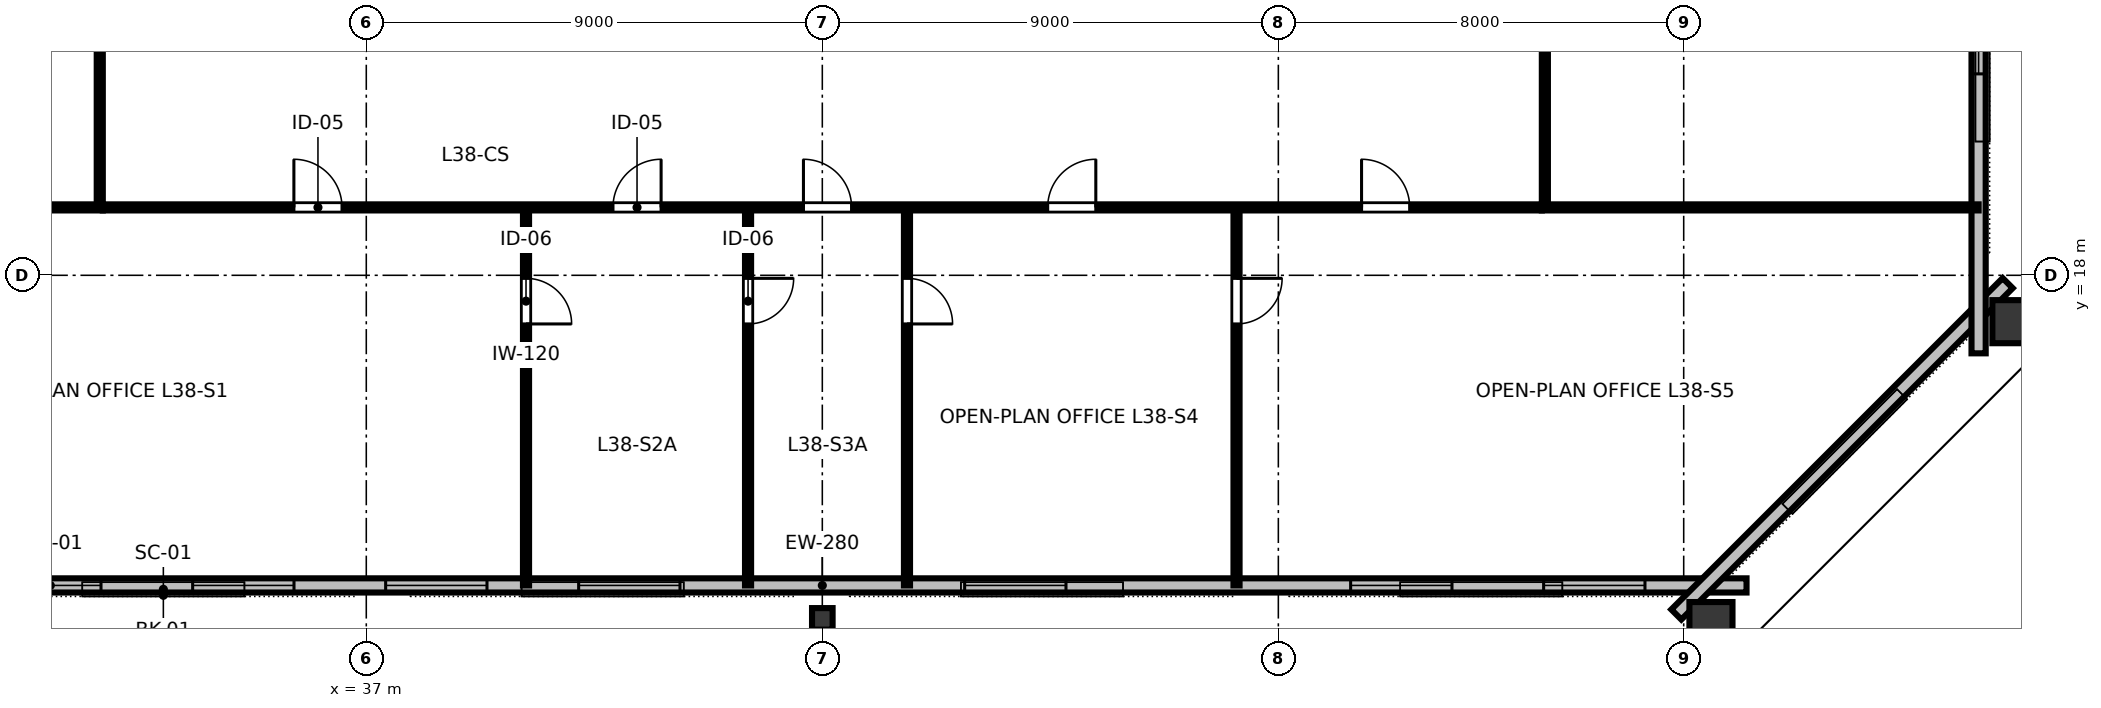
"""IFC4 building model, lengths in metres.
Left out: names, types, materials, properties, quantities, classifications, styles, units other than length and angle.
Written with IfcOpenShell. Run it as: python <this file> out.ifc"""

import sys

from ifc_helpers import new_model, si_unit, direction, frame, frame_2d, origin, origin_2d, place, context, subcontext, project, spatial, rectangle, hollow_rectangle, i_section, extrude, element, fill, save


model = new_model("IFC4")
c1 = context("Model", 3, precision=1e-05, world=origin(), true_north=direction((0.0, 1.0)))
c2 = subcontext(c1, "Body", "Model", "MODEL_VIEW")
j1 = project(units=[si_unit("LENGTHUNIT", "METRE"), si_unit("PLANEANGLEUNIT", "RADIAN")], contexts=[c1])
p1 = place(None, origin())
s1 = spatial("IfcSite", under=j1, at=p1, CompositionType="ELEMENT")
p2 = place(p1, origin())
s2 = spatial("IfcBuilding", under=s1, at=p2, CompositionType="ELEMENT")
p3 = place(p2, frame((0.0, 0.0, 145.6)))
s3 = spatial("IfcBuildingStorey", under=s2, at=p3, CompositionType="ELEMENT", Elevation=145.6)
p4 = place(p3, frame((46.0, 11.22, 0.0), z_axis=(0.0, -0.074245582927, 0.997239987874), x_axis=(1.0, 0.0, 0.0)))
e1 = element("IfcColumn", 1, at=p4, inside=s3, PredefinedType="COLUMN", context=c2, shape_type="SweptSolid", body=[
    extrude(i_section(OverallWidth=0.406, OverallDepth=0.425, WebThickness=0.033, FlangeThickness=0.052, FilletRadius=0.025, at=origin_2d()), origin(), (0.0, 0.0, 1.0), 3.367),
])
p5 = place(p3, frame((63.538, 11.052, 0.0), z_axis=(0.059277862286, -0.074043044101, 0.995491719033), x_axis=(0.780645414878, 0.624974188451, 0.0)))
e2 = element("IfcColumn", 2, at=p5, inside=s3, PredefinedType="COLUMN", context=c2, shape_type="SweptSolid", body=[
    extrude(hollow_rectangle(XDim=0.85, YDim=1.0, WallThickness=0.05, at=origin_2d()), origin(), (0.0, 0.0, 1.0), 3.373),
])
p6 = place(p3, frame((69.591, 17.085, 0.0), z_axis=(0.088840732105, -0.044637403672, 0.995045137927), x_axis=(-0.889124879538, 0.446734568954, 0.099424209766)))
e3 = element("IfcColumn", 3, at=p6, inside=s3, PredefinedType="COLUMN", context=c2, shape_type="SweptSolid", body=[
    extrude(hollow_rectangle(XDim=0.85, YDim=1.0, WallThickness=0.05, at=origin_2d()), origin(), (0.0, 0.0, 1.0), 3.375),
])
p7 = place(p3, frame((27.76, 11.88, 0.0), z_axis=(0.0, 0.0, 1.0), x_axis=(1.0, 0.0, 0.0)))
e4 = element("IfcWall", 4, at=p7, inside=s3, PredefinedType="STANDARD", context=c2, shape_type="SweptSolid", body=[
    extrude(rectangle(XDim=36.48, YDim=0.28, at=frame_2d((18.24, 0.0))), origin(), (0.0, 0.0, 1.0), 3.36),
])
p8 = place(p7, frame((2.004, 0.0, 0.8)))
e5 = element("IfcOpeningElement", 5, at=p8, cuts=e4, PredefinedType="OPENING", context=c2, shape_type="SweptSolid", body=[
    extrude(rectangle(XDim=2.0, YDim=1.95, at=frame_2d((1.0, 0.975))), frame((0.0, 0.15, 0.0), z_axis=(0.0, -1.0, 0.0), x_axis=(1.0, 0.0, 0.0)), (0.0, 0.0, 1.0), 0.3),
])
p9 = place(p7, frame((5.813, 0.0, 0.8)))
e6 = element("IfcOpeningElement", 6, at=p9, cuts=e4, PredefinedType="OPENING", context=c2, shape_type="SweptSolid", body=[
    extrude(rectangle(XDim=2.0, YDim=1.95, at=frame_2d((1.0, 0.975))), frame((0.0, 0.15, 0.0), z_axis=(0.0, -1.0, 0.0), x_axis=(1.0, 0.0, 0.0)), (0.0, 0.0, 1.0), 0.3),
])
p10 = place(p7, frame((9.622, 0.0, 0.8)))
e7 = element("IfcOpeningElement", 7, at=p10, cuts=e4, PredefinedType="OPENING", context=c2, shape_type="SweptSolid", body=[
    extrude(rectangle(XDim=2.0, YDim=1.95, at=frame_2d((1.0, 0.975))), frame((0.0, 0.15, 0.0), z_axis=(0.0, -1.0, 0.0), x_axis=(1.0, 0.0, 0.0)), (0.0, 0.0, 1.0), 0.3),
])
p11 = place(p7, frame((13.431, 0.0, 0.8)))
e8 = element("IfcOpeningElement", 8, at=p11, cuts=e4, PredefinedType="OPENING", context=c2, shape_type="SweptSolid", body=[
    extrude(rectangle(XDim=2.0, YDim=1.95, at=frame_2d((1.0, 0.975))), frame((0.0, 0.15, 0.0), z_axis=(0.0, -1.0, 0.0), x_axis=(1.0, 0.0, 0.0)), (0.0, 0.0, 1.0), 0.3),
])
p12 = place(p7, frame((21.049, 0.0, 0.8)))
e9 = element("IfcOpeningElement", 9, at=p12, cuts=e4, PredefinedType="OPENING", context=c2, shape_type="SweptSolid", body=[
    extrude(rectangle(XDim=2.0, YDim=1.95, at=frame_2d((1.0, 0.975))), frame((0.0, 0.15, 0.0), z_axis=(0.0, -1.0, 0.0), x_axis=(1.0, 0.0, 0.0)), (0.0, 0.0, 1.0), 0.3),
])
p13 = place(p7, frame((28.667, 0.0, 0.8)))
e10 = element("IfcOpeningElement", 10, at=p13, cuts=e4, PredefinedType="OPENING", context=c2, shape_type="SweptSolid", body=[
    extrude(rectangle(XDim=2.0, YDim=1.95, at=frame_2d((1.0, 0.975))), frame((0.0, 0.15, 0.0), z_axis=(0.0, -1.0, 0.0), x_axis=(1.0, 0.0, 0.0)), (0.0, 0.0, 1.0), 0.3),
])
p14 = place(p7, frame((32.476, 0.0, 0.8)))
e11 = element("IfcOpeningElement", 11, at=p14, cuts=e4, PredefinedType="OPENING", context=c2, shape_type="SweptSolid", body=[
    extrude(rectangle(XDim=2.0, YDim=1.95, at=frame_2d((1.0, 0.975))), frame((0.0, 0.15, 0.0), z_axis=(0.0, -1.0, 0.0), x_axis=(1.0, 0.0, 0.0)), (0.0, 0.0, 1.0), 0.3),
])
p15 = place(p3, frame((62.854, 11.306, 0.0), z_axis=(0.0, 0.0, 1.0), x_axis=(0.707106781187, 0.707106781187, 0.0)))
e12 = element("IfcWall", 12, at=p15, inside=s3, PredefinedType="STANDARD", context=c2, shape_type="SweptSolid", body=[
    extrude(rectangle(XDim=9.248, YDim=0.28, at=frame_2d((4.624, 0.0))), origin(), (0.0, 0.0, 1.0), 3.36),
])
p16 = place(p3, frame((68.82, 16.46, 0.0), z_axis=(0.0, 0.0, 1.0), x_axis=(0.0, 1.0, 0.0)))
e13 = element("IfcWall", 13, at=p16, inside=s3, PredefinedType="STANDARD", context=c2, shape_type="SweptSolid", body=[
    extrude(rectangle(XDim=31.08, YDim=0.28, at=frame_2d((15.54, 0.0))), origin(), (0.0, 0.0, 1.0), 3.36),
])
p17 = place(p16, frame((11.86, 0.0, 0.0)))
e14 = element("IfcOpeningElement", 14, at=p17, cuts=e13, PredefinedType="OPENING", context=c2, shape_type="SweptSolid", body=[
    extrude(rectangle(XDim=1.4, YDim=2.15, at=frame_2d((0.7, 1.075))), frame((0.0, 0.15, 0.0), z_axis=(0.0, -1.0, 0.0), x_axis=(1.0, 0.0, 0.0)), (0.0, 0.0, 1.0), 0.3),
])
p18 = place(p16, frame((5.515, 0.0, 0.8)))
e15 = element("IfcOpeningElement", 15, at=p18, cuts=e13, PredefinedType="OPENING", context=c2, shape_type="SweptSolid", body=[
    extrude(rectangle(XDim=2.0, YDim=1.95, at=frame_2d((1.0, 0.975))), frame((0.0, 0.15, 0.0), z_axis=(0.0, -1.0, 0.0), x_axis=(1.0, 0.0, 0.0)), (0.0, 0.0, 1.0), 0.3),
])
p19 = place(p16, frame((9.125, 0.0, 0.8)))
e16 = element("IfcOpeningElement", 16, at=p19, cuts=e13, PredefinedType="OPENING", context=c2, shape_type="SweptSolid", body=[
    extrude(rectangle(XDim=2.0, YDim=1.95, at=frame_2d((1.0, 0.975))), frame((0.0, 0.15, 0.0), z_axis=(0.0, -1.0, 0.0), x_axis=(1.0, 0.0, 0.0)), (0.0, 0.0, 1.0), 0.3),
])
p20 = place(p16, frame((19.955, 0.0, 0.8)))
e17 = element("IfcOpeningElement", 17, at=p20, cuts=e13, PredefinedType="OPENING", context=c2, shape_type="SweptSolid", body=[
    extrude(rectangle(XDim=2.0, YDim=1.95, at=frame_2d((1.0, 0.975))), frame((0.0, 0.15, 0.0), z_axis=(0.0, -1.0, 0.0), x_axis=(1.0, 0.0, 0.0)), (0.0, 0.0, 1.0), 0.3),
])
p21 = place(p16, frame((23.565, 0.0, 0.8)))
e18 = element("IfcOpeningElement", 18, at=p21, cuts=e13, PredefinedType="OPENING", context=c2, shape_type="SweptSolid", body=[
    extrude(rectangle(XDim=2.0, YDim=1.95, at=frame_2d((1.0, 0.975))), frame((0.0, 0.15, 0.0), z_axis=(0.0, -1.0, 0.0), x_axis=(1.0, 0.0, 0.0)), (0.0, 0.0, 1.0), 0.3),
])
p22 = place(p3, frame((40.152, 19.34, 0.0), z_axis=(0.0, 0.0, 1.0), x_axis=(0.0, -1.0, 0.0)))
e19 = element("IfcWall", 19, at=p22, inside=s3, PredefinedType="PARTITIONING", context=c2, shape_type="SweptSolid", body=[
    extrude(rectangle(XDim=7.46, YDim=0.12, at=frame_2d((3.73, 0.0))), origin(), (0.0, 0.0, 1.0), 2.64),
])
p23 = place(p22, frame((1.4, 0.0, 0.0)))
e20 = element("IfcOpeningElement", 20, at=p23, cuts=e19, PredefinedType="OPENING", context=c2, shape_type="SweptSolid", body=[
    extrude(rectangle(XDim=0.9, YDim=2.15, at=frame_2d((0.45, 1.075))), frame((0.0, 0.07, 0.0), z_axis=(0.0, -1.0, 0.0), x_axis=(1.0, 0.0, 0.0)), (0.0, 0.0, 1.0), 0.14),
])
p24 = place(p3, frame((44.534, 19.34, 0.0), z_axis=(0.0, 0.0, 1.0), x_axis=(0.0, -1.0, 0.0)))
e21 = element("IfcWall", 21, at=p24, inside=s3, PredefinedType="PARTITIONING", context=c2, shape_type="SweptSolid", body=[
    extrude(rectangle(XDim=7.46, YDim=0.12, at=frame_2d((3.73, 0.0))), origin(), (0.0, 0.0, 1.0), 2.64),
])
p25 = place(p24, frame((1.4, 0.0, 0.0)))
e22 = element("IfcOpeningElement", 22, at=p25, cuts=e21, PredefinedType="OPENING", context=c2, shape_type="SweptSolid", body=[
    extrude(rectangle(XDim=0.9, YDim=2.15, at=frame_2d((0.45, 1.075))), frame((0.0, 0.07, 0.0), z_axis=(0.0, -1.0, 0.0), x_axis=(1.0, 0.0, 0.0)), (0.0, 0.0, 1.0), 0.14),
])
p26 = place(p3, frame((47.671, 19.34, 0.0), z_axis=(0.0, 0.0, 1.0), x_axis=(0.0, -1.0, 0.0)))
e23 = element("IfcWall", 23, at=p26, inside=s3, PredefinedType="PARTITIONING", context=c2, shape_type="SweptSolid", body=[
    extrude(rectangle(XDim=7.46, YDim=0.12, at=frame_2d((3.73, 0.0))), origin(), (0.0, 0.0, 1.0), 2.64),
])
p27 = place(p26, frame((1.4, 0.0, 0.0)))
e24 = element("IfcOpeningElement", 24, at=p27, cuts=e23, PredefinedType="OPENING", context=c2, shape_type="SweptSolid", body=[
    extrude(rectangle(XDim=0.9, YDim=2.15, at=frame_2d((0.45, 1.075))), frame((0.0, 0.07, 0.0), z_axis=(0.0, -1.0, 0.0), x_axis=(1.0, 0.0, 0.0)), (0.0, 0.0, 1.0), 0.14),
])
p28 = place(p3, frame((54.175, 19.34, 0.0), z_axis=(0.0, 0.0, 1.0), x_axis=(0.0, -1.0, 0.0)))
e25 = element("IfcWall", 25, at=p28, inside=s3, PredefinedType="PARTITIONING", context=c2, shape_type="SweptSolid", body=[
    extrude(rectangle(XDim=7.46, YDim=0.12, at=frame_2d((3.73, 0.0))), origin(), (0.0, 0.0, 1.0), 2.64),
])
p29 = place(p28, frame((1.4, 0.0, 0.0)))
e26 = element("IfcOpeningElement", 26, at=p29, cuts=e25, PredefinedType="OPENING", context=c2, shape_type="SweptSolid", body=[
    extrude(rectangle(XDim=0.9, YDim=2.15, at=frame_2d((0.45, 1.075))), frame((0.0, 0.07, 0.0), z_axis=(0.0, -1.0, 0.0), x_axis=(1.0, 0.0, 0.0)), (0.0, 0.0, 1.0), 0.14),
])
p30 = place(p3, frame((31.8, 19.34, 0.0), z_axis=(0.0, 0.0, 1.0), x_axis=(1.0, 0.0, 0.0)))
e27 = element("IfcWall", 27, at=p30, inside=s3, PredefinedType="PARTITIONING", context=c2, shape_type="SweptSolid", body=[
    extrude(rectangle(XDim=28.4, YDim=0.12, at=frame_2d((14.2, 0.0))), origin(), (0.0, 0.0, 1.0), 2.64),
])
p31 = place(p30, frame((3.771, 0.0, 0.0)))
e28 = element("IfcOpeningElement", 28, at=p31, cuts=e27, PredefinedType="OPENING", context=c2, shape_type="SweptSolid", body=[
    extrude(rectangle(XDim=0.95, YDim=2.15, at=frame_2d((0.475, 1.075))), frame((0.0, 0.07, 0.0), z_axis=(0.0, -1.0, 0.0), x_axis=(1.0, 0.0, 0.0)), (0.0, 0.0, 1.0), 0.14),
])
p32 = place(p30, frame((10.068, 0.0, 0.0)))
e29 = element("IfcOpeningElement", 29, at=p32, cuts=e27, PredefinedType="OPENING", context=c2, shape_type="SweptSolid", body=[
    extrude(rectangle(XDim=0.95, YDim=2.15, at=frame_2d((0.475, 1.075))), frame((0.0, 0.07, 0.0), z_axis=(0.0, -1.0, 0.0), x_axis=(1.0, 0.0, 0.0)), (0.0, 0.0, 1.0), 0.14),
])
p33 = place(p30, frame((13.828, 0.0, 0.0)))
e30 = element("IfcOpeningElement", 30, at=p33, cuts=e27, PredefinedType="OPENING", context=c2, shape_type="SweptSolid", body=[
    extrude(rectangle(XDim=0.95, YDim=2.15, at=frame_2d((0.475, 1.075))), frame((0.0, 0.07, 0.0), z_axis=(0.0, -1.0, 0.0), x_axis=(1.0, 0.0, 0.0)), (0.0, 0.0, 1.0), 0.14),
])
p34 = place(p30, frame((18.648, 0.0, 0.0)))
e31 = element("IfcOpeningElement", 31, at=p34, cuts=e27, PredefinedType="OPENING", context=c2, shape_type="SweptSolid", body=[
    extrude(rectangle(XDim=0.95, YDim=2.15, at=frame_2d((0.475, 1.075))), frame((0.0, 0.07, 0.0), z_axis=(0.0, -1.0, 0.0), x_axis=(1.0, 0.0, 0.0)), (0.0, 0.0, 1.0), 0.14),
])
p35 = place(p30, frame((24.842, 0.0, 0.0)))
e32 = element("IfcOpeningElement", 32, at=p35, cuts=e27, PredefinedType="OPENING", context=c2, shape_type="SweptSolid", body=[
    extrude(rectangle(XDim=0.95, YDim=2.15, at=frame_2d((0.475, 1.075))), frame((0.0, 0.07, 0.0), z_axis=(0.0, -1.0, 0.0), x_axis=(1.0, 0.0, 0.0)), (0.0, 0.0, 1.0), 0.14),
])
p36 = place(p3, frame((31.74, 19.4, 0.0), z_axis=(0.0, 0.0, 1.0), x_axis=(0.0, 1.0, 0.0)))
e33 = element("IfcWall", 33, at=p36, inside=s3, PredefinedType="PARTITIONING", context=c2, shape_type="SweptSolid", body=[
    extrude(rectangle(XDim=11.58, YDim=0.12, at=frame_2d((5.79, 0.0))), origin(), (0.0, 0.0, 1.0), 2.64),
])
p37 = place(p36, frame((4.868, 0.0, 0.0)))
e34 = element("IfcOpeningElement", 34, at=p37, cuts=e33, PredefinedType="OPENING", context=c2, shape_type="SweptSolid", body=[
    extrude(rectangle(XDim=0.95, YDim=2.15, at=frame_2d((0.475, 1.075))), frame((0.0, 0.07, 0.0), z_axis=(0.0, -1.0, 0.0), x_axis=(1.0, 0.0, 0.0)), (0.0, 0.0, 1.0), 0.14),
])
p38 = place(p3, frame((60.26, 19.4, 0.0), z_axis=(0.0, 0.0, 1.0), x_axis=(0.0, 1.0, 0.0)))
e35 = element("IfcWall", 35, at=p38, inside=s3, PredefinedType="PARTITIONING", context=c2, shape_type="SweptSolid", body=[
    extrude(rectangle(XDim=11.58, YDim=0.12, at=frame_2d((5.79, 0.0))), origin(), (0.0, 0.0, 1.0), 2.64),
])
p39 = place(p38, frame((5.415, 0.0, 0.0)))
e36 = element("IfcOpeningElement", 36, at=p39, cuts=e35, PredefinedType="OPENING", context=c2, shape_type="SweptSolid", body=[
    extrude(rectangle(XDim=0.95, YDim=2.15, at=frame_2d((0.475, 1.075))), frame((0.0, 0.07, 0.0), z_axis=(0.0, -1.0, 0.0), x_axis=(1.0, 0.0, 0.0)), (0.0, 0.0, 1.0), 0.14),
])
for number, where, z_axis, x_axis in (
    (37, (31.8, 19.34, 0.0), (0.0, 0.0, 1.0), (-1.0, 0.0, 0.0)),
    (38, (60.2, 19.34, 0.0), (0.0, 0.0, 1.0), (1.0, 0.0, 0.0)),
):
    element("IfcWall", number, at=place(p3, frame(where, z_axis=z_axis, x_axis=x_axis)), inside=s3, PredefinedType="PARTITIONING", context=c2, shape_type="SweptSolid", body=[
        extrude(rectangle(XDim=8.62, YDim=0.12, at=frame_2d((4.31, 0.0))), origin(), (0.0, 0.0, 1.0), 2.64),
    ])
p40 = place(p8, origin())
e39 = element("IfcWindow", 39, at=p40, inside=s3, PartitioningType="SINGLE_PANEL", PredefinedType="WINDOW", context=c2, shape_type="SweptSolid", body=[
    extrude(rectangle(XDim=2.0, YDim=1.95, at=frame_2d((1.0, 0.975))), frame((0.0, 0.03, 0.0), z_axis=(0.0, -1.0, 0.0), x_axis=(1.0, 0.0, 0.0)), (0.0, 0.0, 1.0), 0.06),
])
fill(e5, e39)
p41 = place(p9, origin())
e40 = element("IfcWindow", 40, at=p41, inside=s3, PartitioningType="SINGLE_PANEL", PredefinedType="WINDOW", context=c2, shape_type="SweptSolid", body=[
    extrude(rectangle(XDim=2.0, YDim=1.95, at=frame_2d((1.0, 0.975))), frame((0.0, 0.03, 0.0), z_axis=(0.0, -1.0, 0.0), x_axis=(1.0, 0.0, 0.0)), (0.0, 0.0, 1.0), 0.06),
])
fill(e6, e40)
p42 = place(p10, origin())
e41 = element("IfcWindow", 41, at=p42, inside=s3, PartitioningType="SINGLE_PANEL", PredefinedType="WINDOW", context=c2, shape_type="SweptSolid", body=[
    extrude(rectangle(XDim=2.0, YDim=1.95, at=frame_2d((1.0, 0.975))), frame((0.0, 0.03, 0.0), z_axis=(0.0, -1.0, 0.0), x_axis=(1.0, 0.0, 0.0)), (0.0, 0.0, 1.0), 0.06),
])
fill(e7, e41)
p43 = place(p11, origin())
e42 = element("IfcWindow", 42, at=p43, inside=s3, PartitioningType="SINGLE_PANEL", PredefinedType="WINDOW", context=c2, shape_type="SweptSolid", body=[
    extrude(rectangle(XDim=2.0, YDim=1.95, at=frame_2d((1.0, 0.975))), frame((0.0, 0.03, 0.0), z_axis=(0.0, -1.0, 0.0), x_axis=(1.0, 0.0, 0.0)), (0.0, 0.0, 1.0), 0.06),
])
fill(e8, e42)
p44 = place(p12, origin())
e43 = element("IfcWindow", 43, at=p44, inside=s3, PartitioningType="SINGLE_PANEL", PredefinedType="WINDOW", context=c2, shape_type="SweptSolid", body=[
    extrude(rectangle(XDim=2.0, YDim=1.95, at=frame_2d((1.0, 0.975))), frame((0.0, 0.03, 0.0), z_axis=(0.0, -1.0, 0.0), x_axis=(1.0, 0.0, 0.0)), (0.0, 0.0, 1.0), 0.06),
])
fill(e9, e43)
p45 = place(p13, origin())
e44 = element("IfcWindow", 44, at=p45, inside=s3, PartitioningType="SINGLE_PANEL", PredefinedType="WINDOW", context=c2, shape_type="SweptSolid", body=[
    extrude(rectangle(XDim=2.0, YDim=1.95, at=frame_2d((1.0, 0.975))), frame((0.0, 0.03, 0.0), z_axis=(0.0, -1.0, 0.0), x_axis=(1.0, 0.0, 0.0)), (0.0, 0.0, 1.0), 0.06),
])
fill(e10, e44)
p46 = place(p14, origin())
e45 = element("IfcWindow", 45, at=p46, inside=s3, PartitioningType="SINGLE_PANEL", PredefinedType="WINDOW", context=c2, shape_type="SweptSolid", body=[
    extrude(rectangle(XDim=2.0, YDim=1.95, at=frame_2d((1.0, 0.975))), frame((0.0, 0.03, 0.0), z_axis=(0.0, -1.0, 0.0), x_axis=(1.0, 0.0, 0.0)), (0.0, 0.0, 1.0), 0.06),
])
fill(e11, e45)
p47 = place(p18, origin())
e46 = element("IfcWindow", 46, at=p47, inside=s3, PartitioningType="SINGLE_PANEL", PredefinedType="WINDOW", context=c2, shape_type="SweptSolid", body=[
    extrude(rectangle(XDim=2.0, YDim=1.95, at=frame_2d((1.0, 0.975))), frame((0.0, 0.03, 0.0), z_axis=(0.0, -1.0, 0.0), x_axis=(1.0, 0.0, 0.0)), (0.0, 0.0, 1.0), 0.06),
])
fill(e15, e46)
p48 = place(p23, origin())
e47 = element("IfcDoor", 47, at=p48, inside=s3, OperationType="SINGLE_SWING_RIGHT", PredefinedType="DOOR", context=c2, shape_type="SweptSolid", body=[
    extrude(rectangle(XDim=0.9, YDim=2.15, at=frame_2d((0.45, 1.075))), frame((0.0, 0.025, 0.0), z_axis=(0.0, -1.0, 0.0), x_axis=(1.0, 0.0, 0.0)), (0.0, 0.0, 1.0), 0.05),
])
fill(e20, e47)
p49 = place(p25, origin())
e48 = element("IfcDoor", 48, at=p49, inside=s3, OperationType="SINGLE_SWING_LEFT", PredefinedType="DOOR", context=c2, shape_type="SweptSolid", body=[
    extrude(rectangle(XDim=0.9, YDim=2.15, at=frame_2d((0.45, 1.075))), frame((0.0, 0.025, 0.0), z_axis=(0.0, -1.0, 0.0), x_axis=(1.0, 0.0, 0.0)), (0.0, 0.0, 1.0), 0.05),
])
fill(e22, e48)
p50 = place(p27, origin())
e49 = element("IfcDoor", 49, at=p50, inside=s3, OperationType="SINGLE_SWING_RIGHT", PredefinedType="DOOR", context=c2, shape_type="SweptSolid", body=[
    extrude(rectangle(XDim=0.9, YDim=2.15, at=frame_2d((0.45, 1.075))), frame((0.0, 0.025, 0.0), z_axis=(0.0, -1.0, 0.0), x_axis=(1.0, 0.0, 0.0)), (0.0, 0.0, 1.0), 0.05),
])
fill(e24, e49)
p51 = place(p29, origin())
e50 = element("IfcDoor", 50, at=p51, inside=s3, OperationType="SINGLE_SWING_LEFT", PredefinedType="DOOR", context=c2, shape_type="SweptSolid", body=[
    extrude(rectangle(XDim=0.9, YDim=2.15, at=frame_2d((0.45, 1.075))), frame((0.0, 0.025, 0.0), z_axis=(0.0, -1.0, 0.0), x_axis=(1.0, 0.0, 0.0)), (0.0, 0.0, 1.0), 0.05),
])
fill(e26, e50)
p52 = place(p31, origin())
e51 = element("IfcDoor", 51, at=p52, inside=s3, OperationType="SINGLE_SWING_LEFT", PredefinedType="DOOR", context=c2, shape_type="SweptSolid", body=[
    extrude(rectangle(XDim=0.95, YDim=2.15, at=frame_2d((0.475, 1.075))), frame((0.0, 0.025, 0.0), z_axis=(0.0, -1.0, 0.0), x_axis=(1.0, 0.0, 0.0)), (0.0, 0.0, 1.0), 0.05),
])
fill(e28, e51)
p53 = place(p32, origin())
e52 = element("IfcDoor", 52, at=p53, inside=s3, OperationType="SINGLE_SWING_RIGHT", PredefinedType="DOOR", context=c2, shape_type="SweptSolid", body=[
    extrude(rectangle(XDim=0.95, YDim=2.15, at=frame_2d((0.475, 1.075))), frame((0.0, 0.025, 0.0), z_axis=(0.0, -1.0, 0.0), x_axis=(1.0, 0.0, 0.0)), (0.0, 0.0, 1.0), 0.05),
])
fill(e29, e52)
p54 = place(p33, origin())
e53 = element("IfcDoor", 53, at=p54, inside=s3, OperationType="SINGLE_SWING_LEFT", PredefinedType="DOOR", context=c2, shape_type="SweptSolid", body=[
    extrude(rectangle(XDim=0.95, YDim=2.15, at=frame_2d((0.475, 1.075))), frame((0.0, 0.025, 0.0), z_axis=(0.0, -1.0, 0.0), x_axis=(1.0, 0.0, 0.0)), (0.0, 0.0, 1.0), 0.05),
])
fill(e30, e53)
p55 = place(p34, origin())
e54 = element("IfcDoor", 54, at=p55, inside=s3, OperationType="SINGLE_SWING_RIGHT", PredefinedType="DOOR", context=c2, shape_type="SweptSolid", body=[
    extrude(rectangle(XDim=0.95, YDim=2.15, at=frame_2d((0.475, 1.075))), frame((0.0, 0.025, 0.0), z_axis=(0.0, -1.0, 0.0), x_axis=(1.0, 0.0, 0.0)), (0.0, 0.0, 1.0), 0.05),
])
fill(e31, e54)
p56 = place(p35, origin())
e55 = element("IfcDoor", 55, at=p56, inside=s3, OperationType="SINGLE_SWING_LEFT", PredefinedType="DOOR", context=c2, shape_type="SweptSolid", body=[
    extrude(rectangle(XDim=0.95, YDim=2.15, at=frame_2d((0.475, 1.075))), frame((0.0, 0.025, 0.0), z_axis=(0.0, -1.0, 0.0), x_axis=(1.0, 0.0, 0.0)), (0.0, 0.0, 1.0), 0.05),
])
fill(e32, e55)
save(model, sys.argv[1])
